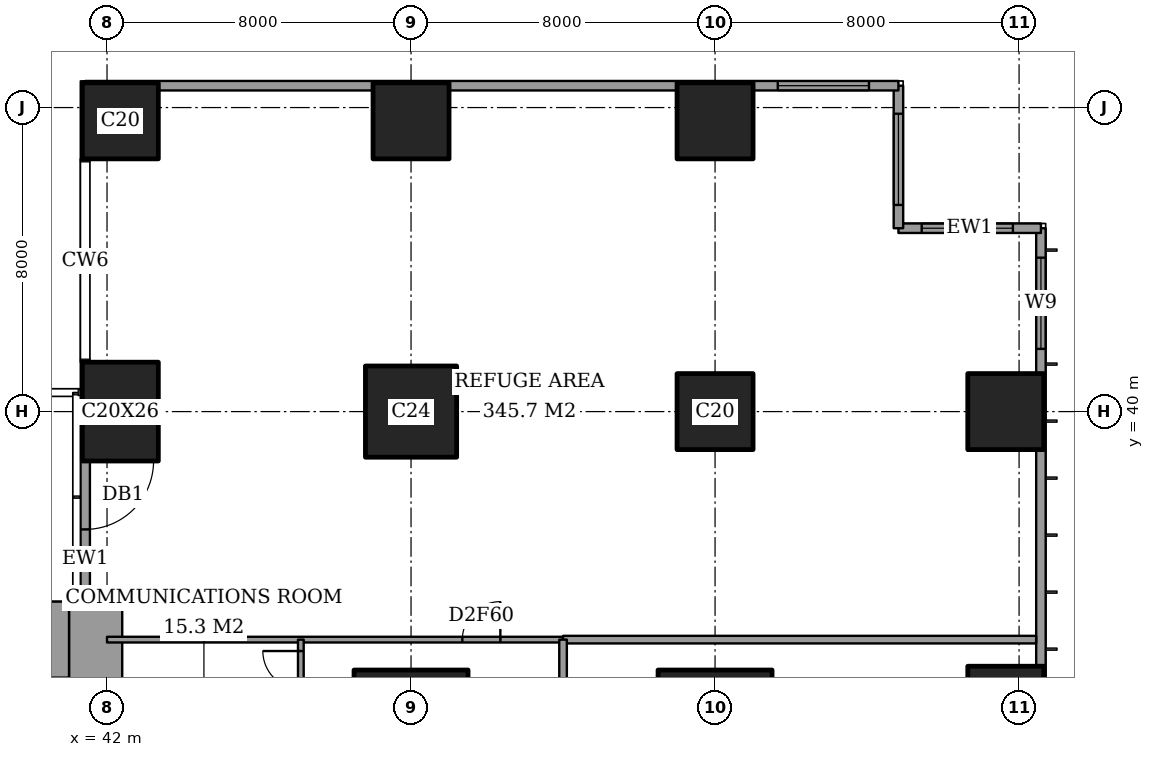
"""IFC4 building model, lengths in metres.
Left out: names, types, materials, properties, quantities, classifications, styles, units other than length and angle.
Written with IfcOpenShell. Run it as: python <this file> out.ifc"""

import sys

from ifc_helpers import new_model, si_unit, direction, frame, frame_2d, origin, origin_2d, place, context, subcontext, project, spatial, rectangle, extrude, element, fill, save


model = new_model("IFC4")
c1 = context("Model", 3, precision=1e-05, world=origin(), true_north=direction((0.0, 1.0)))
c2 = subcontext(c1, "Body", "Model", "MODEL_VIEW")
j1 = project(units=[si_unit("LENGTHUNIT", "METRE"), si_unit("PLANEANGLEUNIT", "RADIAN")], contexts=[c1])
p1 = place(None, origin())
s1 = spatial("IfcSite", under=j1, at=p1, CompositionType="ELEMENT")
p2 = place(p1, origin())
s2 = spatial("IfcBuilding", under=s1, at=p2, CompositionType="ELEMENT")
p3 = place(p2, frame((0.0, 0.0, 90.8)))
s3 = spatial("IfcBuildingStorey", under=s2, at=p3, CompositionType="ELEMENT", Elevation=90.8)
p4 = place(p3, frame((42.35, 40.0, 0.0), z_axis=(0.0, 0.0, 1.0), x_axis=(1.0, 0.0, 0.0)))
e1 = element("IfcColumn", 1, at=p4, inside=s3, PredefinedType="COLUMN", context=c2, shape_type="SweptSolid", body=[
    extrude(rectangle(XDim=2.0, YDim=2.6, at=origin_2d()), origin(), (0.0, 0.0, 1.0), 5.4),
])
p5 = place(p3, frame((42.35, 47.65, 0.0), z_axis=(0.0, 0.0, 1.0), x_axis=(1.0, 0.0, 0.0)))
e2 = element("IfcColumn", 2, at=p5, inside=s3, PredefinedType="COLUMN", context=c2, shape_type="SweptSolid", body=[
    extrude(rectangle(XDim=2.0, YDim=2.0, at=origin_2d()), origin(), (0.0, 0.0, 1.0), 5.4),
])
p6 = place(p3, frame((50.0, 32.0, 0.0), z_axis=(0.0, 0.0, 1.0), x_axis=(1.0, 0.0, 0.0)))
e3 = element("IfcColumn", 3, at=p6, inside=s3, PredefinedType="COLUMN", context=c2, shape_type="SweptSolid", body=[
    extrude(rectangle(XDim=3.0, YDim=2.4, at=origin_2d()), origin(), (0.0, 0.0, 1.0), 5.4),
])
p7 = place(p3, frame((50.0, 40.0, 0.0), z_axis=(0.0, 0.0, 1.0), x_axis=(1.0, 0.0, 0.0)))
e4 = element("IfcColumn", 4, at=p7, inside=s3, PredefinedType="COLUMN", context=c2, shape_type="SweptSolid", body=[
    extrude(rectangle(XDim=2.4, YDim=2.4, at=origin_2d()), origin(), (0.0, 0.0, 1.0), 5.4),
])
p8 = place(p3, frame((50.0, 47.65, 0.0), z_axis=(0.0, 0.0, 1.0), x_axis=(1.0, 0.0, 0.0)))
e5 = element("IfcColumn", 5, at=p8, inside=s3, PredefinedType="COLUMN", context=c2, shape_type="SweptSolid", body=[
    extrude(rectangle(XDim=2.0, YDim=2.0, at=origin_2d()), origin(), (0.0, 0.0, 1.0), 5.4),
])
p9 = place(p3, frame((58.0, 32.0, 0.0), z_axis=(0.0, 0.0, 1.0), x_axis=(1.0, 0.0, 0.0)))
e6 = element("IfcColumn", 6, at=p9, inside=s3, PredefinedType="COLUMN", context=c2, shape_type="SweptSolid", body=[
    extrude(rectangle(XDim=3.0, YDim=2.4, at=origin_2d()), origin(), (0.0, 0.0, 1.0), 5.4),
])
for number, where, z_axis, x_axis in (
    (7, (58.0, 40.0, 0.0), (0.0, 0.0, 1.0), (1.0, 0.0, 0.0)),
    (8, (58.0, 47.65, 0.0), (0.0, 0.0, 1.0), (1.0, 0.0, 0.0)),
):
    element("IfcColumn", number, at=place(p3, frame(where, z_axis=z_axis, x_axis=x_axis)), inside=s3, PredefinedType="COLUMN", context=c2, shape_type="SweptSolid", body=[
        extrude(rectangle(XDim=2.0, YDim=2.0, at=origin_2d()), origin(), (0.0, 0.0, 1.0), 5.4),
    ])
p10 = place(p3, frame((65.65, 32.0, 0.0), z_axis=(0.0, 0.0, 1.0), x_axis=(0.0, 1.0, 0.0)))
e9 = element("IfcColumn", 9, at=p10, inside=s3, PredefinedType="COLUMN", context=c2, shape_type="SweptSolid", body=[
    extrude(rectangle(XDim=2.6, YDim=2.0, at=origin_2d()), origin(), (0.0, 0.0, 1.0), 5.4),
])
p11 = place(p3, frame((65.65, 40.0, 0.0), z_axis=(0.0, 0.0, 1.0), x_axis=(1.0, 0.0, 0.0)))
e10 = element("IfcColumn", 10, at=p11, inside=s3, PredefinedType="COLUMN", context=c2, shape_type="SweptSolid", body=[
    extrude(rectangle(XDim=2.0, YDim=2.0, at=origin_2d()), origin(), (0.0, 0.0, 1.0), 5.4),
])
p12 = place(p3, frame((37.85, 34.0, 0.0), z_axis=(0.0, 0.0, 1.0), x_axis=(1.0, 0.0, 0.0)))
e11 = element("IfcWall", 11, at=p12, inside=s3, PredefinedType="SHEAR", context=c2, shape_type="SweptSolid", body=[
    extrude(rectangle(XDim=3.15, YDim=2.0, at=frame_2d((1.575, 0.0))), origin(), (0.0, 0.0, 1.0), 5.4),
])
p13 = place(p3, frame((41.7, 24.85, 0.0), z_axis=(0.0, 0.0, 1.0), x_axis=(0.0, 1.0, 0.0)))
e12 = element("IfcWall", 12, at=p13, inside=s3, PredefinedType="SHEAR", context=c2, shape_type="SweptSolid", body=[
    extrude(rectangle(XDim=10.15, YDim=1.4, at=frame_2d((5.075, 0.0))), origin(), (0.0, 0.0, 1.0), 5.4),
])
p14 = place(p3, frame((66.575, 3.175, 0.0), z_axis=(0.0, 0.0, 1.0), x_axis=(0.0, 1.0, 0.0)))
e13 = element("IfcWall", 13, at=p14, inside=s3, PredefinedType="SOLIDWALL", context=c2, shape_type="SweptSolid", body=[
    extrude(rectangle(XDim=41.65, YDim=0.25, at=frame_2d((20.825, 0.0))), origin(), (0.0, 0.0, 1.0), 5.4),
])
p15 = place(p14, frame((0.775, 0.0, 0.9)))
e14 = element("IfcOpeningElement", 14, at=p15, cuts=e13, PredefinedType="OPENING", context=c2, shape_type="SweptSolid", body=[
    extrude(rectangle(XDim=2.4, YDim=2.4, at=frame_2d((1.2, 1.2))), frame((0.0, 0.135, 0.0), z_axis=(0.0, -1.0, 0.0), x_axis=(1.0, 0.0, 0.0)), (0.0, 0.0, 1.0), 0.27),
])
p16 = place(p14, frame((38.475, 0.0, 0.9)))
e15 = element("IfcOpeningElement", 15, at=p16, cuts=e13, PredefinedType="OPENING", context=c2, shape_type="SweptSolid", body=[
    extrude(rectangle(XDim=2.4, YDim=2.4, at=frame_2d((1.2, 1.2))), frame((0.0, 0.135, 0.0), z_axis=(0.0, -1.0, 0.0), x_axis=(1.0, 0.0, 0.0)), (0.0, 0.0, 1.0), 0.27),
])
p17 = place(p3, frame((66.575, 44.825, 0.0), z_axis=(0.0, 0.0, 1.0), x_axis=(-1.0, 0.0, 0.0)))
e16 = element("IfcWall", 16, at=p17, inside=s3, PredefinedType="SOLIDWALL", context=c2, shape_type="SweptSolid", body=[
    extrude(rectangle(XDim=3.75, YDim=0.25, at=frame_2d((1.875, 0.0))), origin(), (0.0, 0.0, 1.0), 5.4),
])
p18 = place(p17, frame((0.738, 0.0, 0.9)))
e17 = element("IfcOpeningElement", 17, at=p18, cuts=e16, PredefinedType="OPENING", context=c2, shape_type="SweptSolid", body=[
    extrude(rectangle(XDim=2.4, YDim=2.4, at=frame_2d((1.2, 1.2))), frame((0.0, 0.135, 0.0), z_axis=(0.0, -1.0, 0.0), x_axis=(1.0, 0.0, 0.0)), (0.0, 0.0, 1.0), 0.27),
])
p19 = place(p3, frame((62.825, 44.825, 0.0), z_axis=(0.0, 0.0, 1.0), x_axis=(0.0, 1.0, 0.0)))
e18 = element("IfcWall", 18, at=p19, inside=s3, PredefinedType="SOLIDWALL", context=c2, shape_type="SweptSolid", body=[
    extrude(rectangle(XDim=3.75, YDim=0.25, at=frame_2d((1.875, 0.0))), origin(), (0.0, 0.0, 1.0), 5.4),
])
p20 = place(p19, frame((0.613, 0.0, 0.9)))
e19 = element("IfcOpeningElement", 19, at=p20, cuts=e18, PredefinedType="OPENING", context=c2, shape_type="SweptSolid", body=[
    extrude(rectangle(XDim=2.4, YDim=2.4, at=frame_2d((1.2, 1.2))), frame((0.0, 0.135, 0.0), z_axis=(0.0, -1.0, 0.0), x_axis=(1.0, 0.0, 0.0)), (0.0, 0.0, 1.0), 0.27),
])
p21 = place(p3, frame((62.825, 48.575, 0.0), z_axis=(0.0, 0.0, 1.0), x_axis=(-1.0, 0.0, 0.0)))
e20 = element("IfcWall", 20, at=p21, inside=s3, PredefinedType="SOLIDWALL", context=c2, shape_type="SweptSolid", body=[
    extrude(rectangle(XDim=21.4, YDim=0.25, at=frame_2d((10.7, 0.0))), origin(), (0.0, 0.0, 1.0), 5.4),
])
p22 = place(p21, frame((0.775, 0.0, 0.9)))
e21 = element("IfcOpeningElement", 21, at=p22, cuts=e20, PredefinedType="OPENING", context=c2, shape_type="SweptSolid", body=[
    extrude(rectangle(XDim=2.4, YDim=2.4, at=frame_2d((1.2, 1.2))), frame((0.0, 0.135, 0.0), z_axis=(0.0, -1.0, 0.0), x_axis=(1.0, 0.0, 0.0)), (0.0, 0.0, 1.0), 0.27),
])
p23 = place(p3, frame((41.425, 40.6, 0.0), z_axis=(0.0, 0.0, 1.0), x_axis=(0.0, -1.0, 0.0)))
e22 = element("IfcWall", 22, at=p23, inside=s3, PredefinedType="SOLIDWALL", context=c2, shape_type="SweptSolid", body=[
    extrude(rectangle(XDim=5.6, YDim=0.25, at=frame_2d((2.8, 0.0))), origin(), (0.0, 0.0, 1.0), 5.4),
])
p24 = place(p23, frame((1.9, 0.0, 0.0)))
e23 = element("IfcOpeningElement", 23, at=p24, cuts=e22, PredefinedType="OPENING", context=c2, shape_type="SweptSolid", body=[
    extrude(rectangle(XDim=1.8, YDim=2.4, at=frame_2d((0.9, 1.2))), frame((0.0, 0.135, 0.0), z_axis=(0.0, -1.0, 0.0), x_axis=(1.0, 0.0, 0.0)), (0.0, 0.0, 1.0), 0.27),
])
p25 = place(p3, frame((54.0, 34.0, 0.0), z_axis=(0.0, 0.0, 1.0), x_axis=(1.0, 0.0, 0.0)))
e24 = element("IfcWall", 24, at=p25, inside=s3, PredefinedType="PARTITIONING", context=c2, shape_type="SweptSolid", body=[
    extrude(rectangle(XDim=12.45, YDim=0.2, at=frame_2d((6.225, 0.0))), origin(), (0.0, 0.0, 1.0), 5.15),
])
p26 = place(p3, frame((42.0, 34.0, 0.0), z_axis=(0.0, 0.0, 1.0), x_axis=(1.0, 0.0, 0.0)))
e25 = element("IfcWall", 25, at=p26, inside=s3, PredefinedType="PARTITIONING", context=c2, shape_type="SweptSolid", body=[
    extrude(rectangle(XDim=12.0, YDim=0.15, at=frame_2d((6.0, 0.0))), origin(), (0.0, 0.0, 1.0), 5.15),
])
p27 = place(p26, frame((9.35, 0.0, 0.0)))
e26 = element("IfcOpeningElement", 26, at=p27, cuts=e25, PredefinedType="OPENING", context=c2, shape_type="SweptSolid", body=[
    extrude(rectangle(XDim=1.0, YDim=2.1, at=frame_2d((0.5, 1.05))), frame((0.0, 0.085, 0.0), z_axis=(0.0, -1.0, 0.0), x_axis=(1.0, 0.0, 0.0)), (0.0, 0.0, 1.0), 0.17),
])
p28 = place(p3, frame((47.1, 31.0, 0.0), z_axis=(0.0, 0.0, 1.0), x_axis=(0.0, 1.0, 0.0)))
e27 = element("IfcWall", 27, at=p28, inside=s3, PredefinedType="PARTITIONING", context=c2, shape_type="SweptSolid", body=[
    extrude(rectangle(XDim=3.0, YDim=0.15, at=frame_2d((1.5, 0.0))), origin(), (0.0, 0.0, 1.0), 5.15),
])
p29 = place(p28, frame((1.7, 0.0, 0.0)))
e28 = element("IfcOpeningElement", 28, at=p29, cuts=e27, PredefinedType="OPENING", context=c2, shape_type="SweptSolid", body=[
    extrude(rectangle(XDim=1.0, YDim=2.1, at=frame_2d((0.5, 1.05))), frame((0.0, 0.085, 0.0), z_axis=(0.0, -1.0, 0.0), x_axis=(1.0, 0.0, 0.0)), (0.0, 0.0, 1.0), 0.17),
])
p30 = place(p3, frame((54.0, 30.725, 0.0), z_axis=(0.0, 0.0, 1.0), x_axis=(0.0, 1.0, 0.0)))
e29 = element("IfcWall", 29, at=p30, inside=s3, PredefinedType="PARTITIONING", context=c2, shape_type="SweptSolid", body=[
    extrude(rectangle(XDim=3.275, YDim=0.2, at=frame_2d((1.637, 0.0))), origin(), (0.0, 0.0, 1.0), 5.15),
])
p31 = place(p16, origin())
e30 = element("IfcWindow", 30, at=p31, inside=s3, PartitioningType="SINGLE_PANEL", PredefinedType="WINDOW", context=c2, shape_type="SweptSolid", body=[
    extrude(rectangle(XDim=2.4, YDim=2.4, at=frame_2d((1.2, 1.2))), frame((0.0, 0.03, 0.0), z_axis=(0.0, -1.0, 0.0), x_axis=(1.0, 0.0, 0.0)), (0.0, 0.0, 1.0), 0.06),
])
fill(e15, e30)
p32 = place(p18, origin())
e31 = element("IfcWindow", 31, at=p32, inside=s3, PartitioningType="SINGLE_PANEL", PredefinedType="WINDOW", context=c2, shape_type="SweptSolid", body=[
    extrude(rectangle(XDim=2.4, YDim=2.4, at=frame_2d((1.2, 1.2))), frame((0.0, 0.03, 0.0), z_axis=(0.0, -1.0, 0.0), x_axis=(1.0, 0.0, 0.0)), (0.0, 0.0, 1.0), 0.06),
])
fill(e17, e31)
p33 = place(p20, origin())
e32 = element("IfcWindow", 32, at=p33, inside=s3, PartitioningType="SINGLE_PANEL", PredefinedType="WINDOW", context=c2, shape_type="SweptSolid", body=[
    extrude(rectangle(XDim=2.4, YDim=2.4, at=frame_2d((1.2, 1.2))), frame((0.0, 0.03, 0.0), z_axis=(0.0, -1.0, 0.0), x_axis=(1.0, 0.0, 0.0)), (0.0, 0.0, 1.0), 0.06),
])
fill(e19, e32)
p34 = place(p22, origin())
e33 = element("IfcWindow", 33, at=p34, inside=s3, PartitioningType="SINGLE_PANEL", PredefinedType="WINDOW", context=c2, shape_type="SweptSolid", body=[
    extrude(rectangle(XDim=2.4, YDim=2.4, at=frame_2d((1.2, 1.2))), frame((0.0, 0.03, 0.0), z_axis=(0.0, -1.0, 0.0), x_axis=(1.0, 0.0, 0.0)), (0.0, 0.0, 1.0), 0.06),
])
fill(e21, e33)
p35 = place(p24, origin())
e34 = element("IfcDoor", 34, at=p35, inside=s3, OperationType="DOUBLE_DOOR_DOUBLE_SWING", PredefinedType="DOOR", context=c2, shape_type="SweptSolid", body=[
    extrude(rectangle(XDim=1.8, YDim=2.4, at=frame_2d((0.9, 1.2))), frame((0.0, 0.025, 0.0), z_axis=(0.0, -1.0, 0.0), x_axis=(1.0, 0.0, 0.0)), (0.0, 0.0, 1.0), 0.05),
])
fill(e23, e34)
p36 = place(p27, origin())
e35 = element("IfcDoor", 35, at=p36, inside=s3, OperationType="SINGLE_SWING_LEFT", PredefinedType="DOOR", context=c2, shape_type="SweptSolid", body=[
    extrude(rectangle(XDim=1.0, YDim=2.1, at=frame_2d((0.5, 1.05))), frame((0.0, 0.025, 0.0), z_axis=(0.0, -1.0, 0.0), x_axis=(1.0, 0.0, 0.0)), (0.0, 0.0, 1.0), 0.05),
])
fill(e26, e35)
p37 = place(p29, origin())
e36 = element("IfcDoor", 36, at=p37, inside=s3, OperationType="SINGLE_SWING_LEFT", PredefinedType="DOOR", context=c2, shape_type="SweptSolid", body=[
    extrude(rectangle(XDim=1.0, YDim=2.1, at=frame_2d((0.5, 1.05))), frame((0.0, 0.025, 0.0), z_axis=(0.0, -1.0, 0.0), x_axis=(1.0, 0.0, 0.0)), (0.0, 0.0, 1.0), 0.05),
])
fill(e28, e36)
save(model, sys.argv[1])
